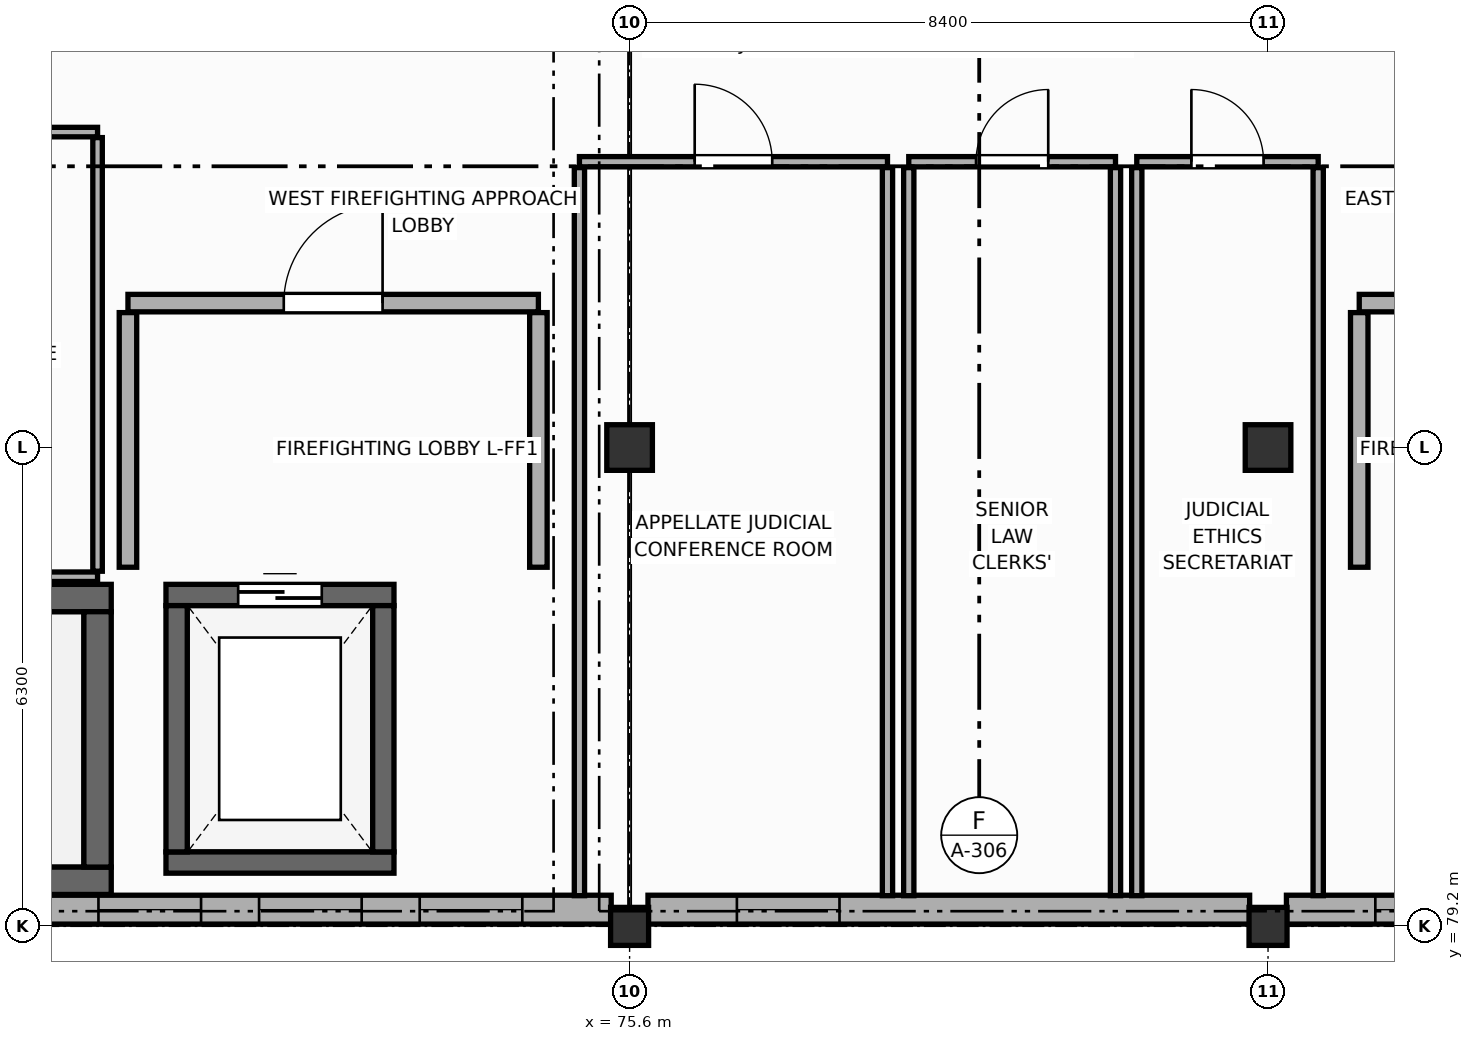
"""IFC4 building model, lengths in metres.
Left out: names, types, materials, properties, quantities, classifications, styles, units other than length and angle.
Written with IfcOpenShell. Run it as: python <this file> out.ifc"""

import sys

from ifc_helpers import new_model, si_unit, direction, frame, frame_2d, origin, origin_2d, place, context, subcontext, project, spatial, rectangle, extrude, element, fill, save


model = new_model("IFC4")
c1 = context("Model", 3, precision=1e-05, world=origin(), true_north=direction((0.0, 1.0)))
c2 = subcontext(c1, "Body", "Model", "MODEL_VIEW")
j1 = project(units=[si_unit("LENGTHUNIT", "METRE"), si_unit("PLANEANGLEUNIT", "RADIAN")], contexts=[c1])
p1 = place(None, origin())
s1 = spatial("IfcSite", under=j1, at=p1, CompositionType="ELEMENT")
p2 = place(p1, origin())
s2 = spatial("IfcBuilding", under=s1, at=p2, CompositionType="ELEMENT")
p3 = place(p2, frame((0.0, 0.0, 27.0)))
s3 = spatial("IfcBuildingStorey", under=s2, at=p3, CompositionType="ELEMENT", Elevation=27.0)
p4 = place(p3, frame((75.6, 79.2, 0.0), z_axis=(0.0, 0.0, 1.0), x_axis=(1.0, 0.0, 0.0)))
e1 = element("IfcColumn", 1, at=p4, inside=s3, PredefinedType="COLUMN", context=c2, shape_type="SweptSolid", body=[
    extrude(rectangle(XDim=0.5, YDim=0.5, at=origin_2d()), origin(), (0.0, 0.0, 1.0), 4.2),
])
p5 = place(p3, frame((75.6, 85.5, 0.0), z_axis=(0.0, 0.0, 1.0), x_axis=(1.0, 0.0, 0.0)))
e2 = element("IfcColumn", 2, at=p5, inside=s3, PredefinedType="COLUMN", context=c2, shape_type="SweptSolid", body=[
    extrude(rectangle(XDim=0.6, YDim=0.6, at=origin_2d()), origin(), (0.0, 0.0, 1.0), 4.2),
])
p6 = place(p3, frame((84.0, 79.2, 0.0), z_axis=(0.0, 0.0, 1.0), x_axis=(1.0, 0.0, 0.0)))
e3 = element("IfcColumn", 3, at=p6, inside=s3, PredefinedType="COLUMN", context=c2, shape_type="SweptSolid", body=[
    extrude(rectangle(XDim=0.5, YDim=0.5, at=origin_2d()), origin(), (0.0, 0.0, 1.0), 4.2),
])
p7 = place(p3, frame((84.0, 85.5, 0.0), z_axis=(0.0, 0.0, 1.0), x_axis=(1.0, 0.0, 0.0)))
e4 = element("IfcColumn", 4, at=p7, inside=s3, PredefinedType="COLUMN", context=c2, shape_type="SweptSolid", body=[
    extrude(rectangle(XDim=0.6, YDim=0.6, at=origin_2d()), origin(), (0.0, 0.0, 1.0), 4.2),
])
p8 = place(p3, frame((75.358, 79.42, 0.0), z_axis=(0.0, 0.0, 1.0), x_axis=(-1.0, 0.0, 0.0)))
e5 = element("IfcWall", 5, at=p8, inside=s3, PredefinedType="STANDARD", context=c2, shape_type="SweptSolid", body=[
    extrude(rectangle(XDim=7.916, YDim=0.38, at=frame_2d((3.958, 0.0))), origin(), (0.0, 0.0, 1.0), 3.51),
])
p9 = place(p8, frame((1.17, 0.0, 0.85)))
e6 = element("IfcOpeningElement", 6, at=p9, cuts=e5, PredefinedType="OPENING", context=c2, shape_type="SweptSolid", body=[
    extrude(rectangle(XDim=1.35, YDim=1.95, at=frame_2d((0.675, 0.975))), frame((0.0, 0.2, 0.0), z_axis=(0.0, -1.0, 0.0), x_axis=(1.0, 0.0, 0.0)), (0.0, 0.0, 1.0), 0.4),
])
p10 = place(p8, frame((3.283, 0.0, 0.85)))
e7 = element("IfcOpeningElement", 7, at=p10, cuts=e5, PredefinedType="OPENING", context=c2, shape_type="SweptSolid", body=[
    extrude(rectangle(XDim=1.35, YDim=1.95, at=frame_2d((0.675, 0.975))), frame((0.0, 0.2, 0.0), z_axis=(0.0, -1.0, 0.0), x_axis=(1.0, 0.0, 0.0)), (0.0, 0.0, 1.0), 0.4),
])
p11 = place(p8, frame((5.396, 0.0, 0.85)))
e8 = element("IfcOpeningElement", 8, at=p11, cuts=e5, PredefinedType="OPENING", context=c2, shape_type="SweptSolid", body=[
    extrude(rectangle(XDim=1.35, YDim=1.95, at=frame_2d((0.675, 0.975))), frame((0.0, 0.2, 0.0), z_axis=(0.0, -1.0, 0.0), x_axis=(1.0, 0.0, 0.0)), (0.0, 0.0, 1.0), 0.4),
])
p12 = place(p3, frame((83.758, 79.42, 0.0), z_axis=(0.0, 0.0, 1.0), x_axis=(-1.0, 0.0, 0.0)))
e9 = element("IfcWall", 9, at=p12, inside=s3, PredefinedType="STANDARD", context=c2, shape_type="SweptSolid", body=[
    extrude(rectangle(XDim=7.916, YDim=0.38, at=frame_2d((3.958, 0.0))), origin(), (0.0, 0.0, 1.0), 3.51),
])
p13 = place(p12, frame((5.396, 0.0, 0.85)))
e10 = element("IfcOpeningElement", 10, at=p13, cuts=e9, PredefinedType="OPENING", context=c2, shape_type="SweptSolid", body=[
    extrude(rectangle(XDim=1.35, YDim=1.95, at=frame_2d((0.675, 0.975))), frame((0.0, 0.2, 0.0), z_axis=(0.0, -1.0, 0.0), x_axis=(1.0, 0.0, 0.0)), (0.0, 0.0, 1.0), 0.4),
])
p14 = place(p3, frame((92.158, 79.42, 0.0), z_axis=(0.0, 0.0, 1.0), x_axis=(-1.0, 0.0, 0.0)))
e11 = element("IfcWall", 11, at=p14, inside=s3, PredefinedType="STANDARD", context=c2, shape_type="SweptSolid", body=[
    extrude(rectangle(XDim=7.916, YDim=0.38, at=frame_2d((3.958, 0.0))), origin(), (0.0, 0.0, 1.0), 3.51),
])
p15 = place(p14, frame((1.17, 0.0, 0.85)))
e12 = element("IfcOpeningElement", 12, at=p15, cuts=e11, PredefinedType="OPENING", context=c2, shape_type="SweptSolid", body=[
    extrude(rectangle(XDim=1.35, YDim=1.95, at=frame_2d((0.675, 0.975))), frame((0.0, 0.2, 0.0), z_axis=(0.0, -1.0, 0.0), x_axis=(1.0, 0.0, 0.0)), (0.0, 0.0, 1.0), 0.4),
])
p16 = place(p14, frame((3.283, 0.0, 0.85)))
e13 = element("IfcOpeningElement", 13, at=p16, cuts=e11, PredefinedType="OPENING", context=c2, shape_type="SweptSolid", body=[
    extrude(rectangle(XDim=1.35, YDim=1.95, at=frame_2d((0.675, 0.975))), frame((0.0, 0.2, 0.0), z_axis=(0.0, -1.0, 0.0), x_axis=(1.0, 0.0, 0.0)), (0.0, 0.0, 1.0), 0.4),
])
p17 = place(p14, frame((5.396, 0.0, 0.85)))
e14 = element("IfcOpeningElement", 14, at=p17, cuts=e11, PredefinedType="OPENING", context=c2, shape_type="SweptSolid", body=[
    extrude(rectangle(XDim=1.35, YDim=1.95, at=frame_2d((0.675, 0.975))), frame((0.0, 0.2, 0.0), z_axis=(0.0, -1.0, 0.0), x_axis=(1.0, 0.0, 0.0)), (0.0, 0.0, 1.0), 0.4),
])
for number, where, z_axis, x_axis in (
    (15, (59.42, 83.52, 0.0), (0.0, 0.0, 1.0), (1.0, 0.0, 0.0)),
    (16, (68.78, 79.8, 0.0), (0.0, 0.0, 1.0), (-1.0, 0.0, 0.0)),
):
    element("IfcWall", number, at=place(p3, frame(where, z_axis=z_axis, x_axis=x_axis)), inside=s3, PredefinedType="SHEAR", context=c2, shape_type="SweptSolid", body=[
        extrude(rectangle(XDim=9.36, YDim=0.36, at=frame_2d((4.68, 0.0))), origin(), (0.0, 0.0, 1.0), 3.98),
    ])
p18 = place(p3, frame((68.6, 83.34, 0.0), z_axis=(0.0, 0.0, 1.0), x_axis=(0.0, -1.0, 0.0)))
e17 = element("IfcWall", 17, at=p18, inside=s3, PredefinedType="SHEAR", context=c2, shape_type="SweptSolid", body=[
    extrude(rectangle(XDim=3.36, YDim=0.36, at=frame_2d((1.68, 0.0))), origin(), (0.0, 0.0, 1.0), 3.98),
])
p19 = place(p3, frame((69.5, 83.56, 0.0), z_axis=(0.0, 0.0, 1.0), x_axis=(1.0, 0.0, 0.0)))
e18 = element("IfcWall", 18, at=p19, inside=s3, PredefinedType="SHEAR", context=c2, shape_type="SweptSolid", body=[
    extrude(rectangle(XDim=3.0, YDim=0.28, at=frame_2d((1.5, 0.0))), origin(), (0.0, 0.0, 1.0), 3.98),
])
p20 = place(p19, frame((0.95, 0.0, 0.0)))
e19 = element("IfcOpeningElement", 19, at=p20, cuts=e18, PredefinedType="OPENING", context=c2, shape_type="SweptSolid", body=[
    extrude(rectangle(XDim=1.1, YDim=2.2, at=frame_2d((0.55, 1.1))), frame((0.0, 0.15, 0.0), z_axis=(0.0, -1.0, 0.0), x_axis=(1.0, 0.0, 0.0)), (0.0, 0.0, 1.0), 0.3),
])
p21 = place(p3, frame((72.5, 80.04, 0.0), z_axis=(0.0, 0.0, 1.0), x_axis=(-1.0, 0.0, 0.0)))
e20 = element("IfcWall", 20, at=p21, inside=s3, PredefinedType="SHEAR", context=c2, shape_type="SweptSolid", body=[
    extrude(rectangle(XDim=3.0, YDim=0.28, at=frame_2d((1.5, 0.0))), origin(), (0.0, 0.0, 1.0), 3.98),
])
for number, where, z_axis, x_axis in (
    (21, (69.64, 80.18, 0.0), (0.0, 0.0, 1.0), (0.0, 1.0, 0.0)),
    (22, (72.36, 83.42, 0.0), (0.0, 0.0, 1.0), (0.0, -1.0, 0.0)),
):
    element("IfcWall", number, at=place(p3, frame(where, z_axis=z_axis, x_axis=x_axis)), inside=s3, PredefinedType="SHEAR", context=c2, shape_type="SweptSolid", body=[
        extrude(rectangle(XDim=3.24, YDim=0.28, at=frame_2d((1.62, 0.0))), origin(), (0.0, 0.0, 1.0), 3.98),
    ])
p22 = place(p3, frame((69.0, 87.4, 0.0), z_axis=(0.0, 0.0, 1.0), x_axis=(1.0, 0.0, 0.0)))
e23 = element("IfcWall", 23, at=p22, inside=s3, PredefinedType="STANDARD", context=c2, shape_type="SweptSolid", body=[
    extrude(rectangle(XDim=5.4, YDim=0.23, at=frame_2d((2.7, 0.0))), origin(), (0.0, 0.0, 1.0), 3.965),
])
p23 = place(p22, frame((2.05, 0.0, 0.0)))
e24 = element("IfcOpeningElement", 24, at=p23, cuts=e23, PredefinedType="OPENING", context=c2, shape_type="SweptSolid", body=[
    extrude(rectangle(XDim=1.3, YDim=2.2, at=frame_2d((0.65, 1.1))), frame((0.0, 0.125, 0.0), z_axis=(0.0, -1.0, 0.0), x_axis=(1.0, 0.0, 0.0)), (0.0, 0.0, 1.0), 0.25),
])
for number, where, z_axis, x_axis in (
    (25, (69.0, 83.925, 0.0), (0.0, 0.0, 1.0), (0.0, 1.0, 0.0)),
    (26, (74.4, 87.275, 0.0), (0.0, 0.0, 1.0), (0.0, -1.0, 0.0)),
):
    element("IfcWall", number, at=place(p3, frame(where, z_axis=z_axis, x_axis=x_axis)), inside=s3, PredefinedType="STANDARD", context=c2, shape_type="SweptSolid", body=[
        extrude(rectangle(XDim=3.35, YDim=0.23, at=frame_2d((1.675, 0.0))), origin(), (0.0, 0.0, 1.0), 3.41),
    ])
p24 = place(p3, frame((85.2, 87.4, 0.0), z_axis=(0.0, 0.0, 1.0), x_axis=(1.0, 0.0, 0.0)))
e27 = element("IfcWall", 27, at=p24, inside=s3, PredefinedType="STANDARD", context=c2, shape_type="SweptSolid", body=[
    extrude(rectangle(XDim=5.4, YDim=0.23, at=frame_2d((2.7, 0.0))), origin(), (0.0, 0.0, 1.0), 3.965),
])
p25 = place(p24, frame((2.05, 0.0, 0.0)))
e28 = element("IfcOpeningElement", 28, at=p25, cuts=e27, PredefinedType="OPENING", context=c2, shape_type="SweptSolid", body=[
    extrude(rectangle(XDim=1.3, YDim=2.2, at=frame_2d((0.65, 1.1))), frame((0.0, 0.125, 0.0), z_axis=(0.0, -1.0, 0.0), x_axis=(1.0, 0.0, 0.0)), (0.0, 0.0, 1.0), 0.25),
])
p26 = place(p3, frame((85.2, 83.925, 0.0), z_axis=(0.0, 0.0, 1.0), x_axis=(0.0, 1.0, 0.0)))
e29 = element("IfcWall", 29, at=p26, inside=s3, PredefinedType="STANDARD", context=c2, shape_type="SweptSolid", body=[
    extrude(rectangle(XDim=3.35, YDim=0.23, at=frame_2d((1.675, 0.0))), origin(), (0.0, 0.0, 1.0), 3.41),
])
p27 = place(p3, frame((66.0, 89.65, 0.0), z_axis=(0.0, 0.0, 1.0), x_axis=(1.0, 0.0, 0.0)))
e30 = element("IfcWall", 30, at=p27, inside=s3, PredefinedType="PARTITIONING", context=c2, shape_type="SweptSolid", body=[
    extrude(rectangle(XDim=2.6, YDim=0.125, at=frame_2d((1.3, 0.0))), origin(), (0.0, 0.0, 1.0), 3.51),
])
p28 = place(p27, frame((0.8, 0.0, 0.0)))
e31 = element("IfcOpeningElement", 31, at=p28, cuts=e30, PredefinedType="OPENING", context=c2, shape_type="SweptSolid", body=[
    extrude(rectangle(XDim=1.0, YDim=2.1, at=frame_2d((0.5, 1.05))), frame((0.0, 0.073, 0.0), z_axis=(0.0, -1.0, 0.0), x_axis=(1.0, 0.0, 0.0)), (0.0, 0.0, 1.0), 0.145),
])
p29 = place(p3, frame((68.6, 83.8, 0.0), z_axis=(0.0, 0.0, 1.0), x_axis=(-1.0, 0.0, 0.0)))
e32 = element("IfcWall", 32, at=p29, inside=s3, PredefinedType="PARTITIONING", context=c2, shape_type="SweptSolid", body=[
    extrude(rectangle(XDim=2.6, YDim=0.125, at=frame_2d((1.3, 0.0))), origin(), (0.0, 0.0, 1.0), 3.51),
])
p30 = place(p3, frame((68.6, 89.577, 0.0), z_axis=(0.0, 0.0, 1.0), x_axis=(0.0, -1.0, 0.0)))
e33 = element("IfcWall", 33, at=p30, inside=s3, PredefinedType="PARTITIONING", context=c2, shape_type="SweptSolid", body=[
    extrude(rectangle(XDim=5.705, YDim=0.125, at=frame_2d((2.853, 0.0))), origin(), (0.0, 0.0, 1.0), 3.41),
])
p31 = place(p3, frame((74.94, 89.26, 0.0), z_axis=(0.0, 0.0, 1.0), x_axis=(1.0, 0.0, 0.0)))
e34 = element("IfcWall", 34, at=p31, inside=s3, PredefinedType="PARTITIONING", context=c2, shape_type="SweptSolid", body=[
    extrude(rectangle(XDim=4.053, YDim=0.135, at=frame_2d((2.026, 0.0))), origin(), (0.0, 0.0, 1.0), 3.51),
])
p32 = place(p31, frame((1.517, 0.0, 0.0)))
e35 = element("IfcOpeningElement", 35, at=p32, cuts=e34, PredefinedType="OPENING", context=c2, shape_type="SweptSolid", body=[
    extrude(rectangle(XDim=1.02, YDim=2.15, at=frame_2d((0.51, 1.075))), frame((0.0, 0.077, 0.0), z_axis=(0.0, -1.0, 0.0), x_axis=(1.0, 0.0, 0.0)), (0.0, 0.0, 1.0), 0.155),
])
for number, where, z_axis, x_axis in (
    (36, (74.94, 79.604, 0.0), (0.0, 0.0, 1.0), (0.0, 1.0, 0.0)),
    (37, (78.993, 89.183, 0.0), (0.0, 0.0, 1.0), (0.0, -1.0, 0.0)),
):
    element("IfcWall", number, at=place(p3, frame(where, z_axis=z_axis, x_axis=x_axis)), inside=s3, PredefinedType="PARTITIONING", context=c2, shape_type="SweptSolid", body=[
        extrude(rectangle(XDim=9.579, YDim=0.135, at=frame_2d((4.789, 0.0))), origin(), (0.0, 0.0, 1.0), 3.41),
    ])
p33 = place(p3, frame((79.273, 89.26, 0.0), z_axis=(0.0, 0.0, 1.0), x_axis=(1.0, 0.0, 0.0)))
e38 = element("IfcWall", 38, at=p33, inside=s3, PredefinedType="PARTITIONING", context=c2, shape_type="SweptSolid", body=[
    extrude(rectangle(XDim=2.72, YDim=0.135, at=frame_2d((1.36, 0.0))), origin(), (0.0, 0.0, 1.0), 3.965),
])
p34 = place(p33, frame((0.885, 0.0, 0.0)))
e39 = element("IfcOpeningElement", 39, at=p34, cuts=e38, PredefinedType="OPENING", context=c2, shape_type="SweptSolid", body=[
    extrude(rectangle(XDim=0.95, YDim=2.15, at=frame_2d((0.475, 1.075))), frame((0.0, 0.077, 0.0), z_axis=(0.0, -1.0, 0.0), x_axis=(1.0, 0.0, 0.0)), (0.0, 0.0, 1.0), 0.155),
])
for number, where, z_axis, x_axis in (
    (40, (79.273, 79.604, 0.0), (0.0, 0.0, 1.0), (0.0, 1.0, 0.0)),
    (41, (81.993, 89.183, 0.0), (0.0, 0.0, 1.0), (0.0, -1.0, 0.0)),
):
    element("IfcWall", number, at=place(p3, frame(where, z_axis=z_axis, x_axis=x_axis)), inside=s3, PredefinedType="PARTITIONING", context=c2, shape_type="SweptSolid", body=[
        extrude(rectangle(XDim=9.579, YDim=0.135, at=frame_2d((4.789, 0.0))), origin(), (0.0, 0.0, 1.0), 3.41),
    ])
p35 = place(p3, frame((82.273, 89.26, 0.0), z_axis=(0.0, 0.0, 1.0), x_axis=(1.0, 0.0, 0.0)))
e42 = element("IfcWall", 42, at=p35, inside=s3, PredefinedType="PARTITIONING", context=c2, shape_type="SweptSolid", body=[
    extrude(rectangle(XDim=2.387, YDim=0.135, at=frame_2d((1.193, 0.0))), origin(), (0.0, 0.0, 1.0), 3.51),
])
p36 = place(p35, frame((0.719, 0.0, 0.0)))
e43 = element("IfcOpeningElement", 43, at=p36, cuts=e42, PredefinedType="OPENING", context=c2, shape_type="SweptSolid", body=[
    extrude(rectangle(XDim=0.95, YDim=2.15, at=frame_2d((0.475, 1.075))), frame((0.0, 0.077, 0.0), z_axis=(0.0, -1.0, 0.0), x_axis=(1.0, 0.0, 0.0)), (0.0, 0.0, 1.0), 0.155),
])
for number, where, z_axis, x_axis in (
    (44, (82.273, 79.604, 0.0), (0.0, 0.0, 1.0), (0.0, 1.0, 0.0)),
    (45, (84.66, 89.183, 0.0), (0.0, 0.0, 1.0), (0.0, -1.0, 0.0)),
):
    element("IfcWall", number, at=place(p3, frame(where, z_axis=z_axis, x_axis=x_axis)), inside=s3, PredefinedType="PARTITIONING", context=c2, shape_type="SweptSolid", body=[
        extrude(rectangle(XDim=9.579, YDim=0.135, at=frame_2d((4.789, 0.0))), origin(), (0.0, 0.0, 1.0), 3.41),
    ])
p37 = place(p9, origin())
e46 = element("IfcWindow", 46, at=p37, inside=s3, PartitioningType="SINGLE_PANEL", PredefinedType="WINDOW", context=c2, shape_type="SweptSolid", body=[
    extrude(rectangle(XDim=1.35, YDim=1.95, at=frame_2d((0.675, 0.975))), frame((0.0, 0.03, 0.0), z_axis=(0.0, -1.0, 0.0), x_axis=(1.0, 0.0, 0.0)), (0.0, 0.0, 1.0), 0.06),
])
fill(e6, e46)
p38 = place(p10, origin())
e47 = element("IfcWindow", 47, at=p38, inside=s3, PartitioningType="SINGLE_PANEL", PredefinedType="WINDOW", context=c2, shape_type="SweptSolid", body=[
    extrude(rectangle(XDim=1.35, YDim=1.95, at=frame_2d((0.675, 0.975))), frame((0.0, 0.03, 0.0), z_axis=(0.0, -1.0, 0.0), x_axis=(1.0, 0.0, 0.0)), (0.0, 0.0, 1.0), 0.06),
])
fill(e7, e47)
p39 = place(p11, origin())
e48 = element("IfcWindow", 48, at=p39, inside=s3, PartitioningType="SINGLE_PANEL", PredefinedType="WINDOW", context=c2, shape_type="SweptSolid", body=[
    extrude(rectangle(XDim=1.35, YDim=1.95, at=frame_2d((0.675, 0.975))), frame((0.0, 0.03, 0.0), z_axis=(0.0, -1.0, 0.0), x_axis=(1.0, 0.0, 0.0)), (0.0, 0.0, 1.0), 0.06),
])
fill(e8, e48)
p40 = place(p13, origin())
e49 = element("IfcWindow", 49, at=p40, inside=s3, PartitioningType="SINGLE_PANEL", PredefinedType="WINDOW", context=c2, shape_type="SweptSolid", body=[
    extrude(rectangle(XDim=1.35, YDim=1.95, at=frame_2d((0.675, 0.975))), frame((0.0, 0.03, 0.0), z_axis=(0.0, -1.0, 0.0), x_axis=(1.0, 0.0, 0.0)), (0.0, 0.0, 1.0), 0.06),
])
fill(e10, e49)
p41 = place(p17, origin())
e50 = element("IfcWindow", 50, at=p41, inside=s3, PartitioningType="SINGLE_PANEL", PredefinedType="WINDOW", context=c2, shape_type="SweptSolid", body=[
    extrude(rectangle(XDim=1.35, YDim=1.95, at=frame_2d((0.675, 0.975))), frame((0.0, 0.03, 0.0), z_axis=(0.0, -1.0, 0.0), x_axis=(1.0, 0.0, 0.0)), (0.0, 0.0, 1.0), 0.06),
])
fill(e14, e50)
p42 = place(p20, origin())
e51 = element("IfcDoor", 51, at=p42, inside=s3, OperationType="DOUBLE_DOOR_SLIDING", PredefinedType="DOOR", context=c2, shape_type="SweptSolid", body=[
    extrude(rectangle(XDim=1.1, YDim=2.2, at=frame_2d((0.55, 1.1))), frame((0.0, 0.025, 0.0), z_axis=(0.0, -1.0, 0.0), x_axis=(1.0, 0.0, 0.0)), (0.0, 0.0, 1.0), 0.05),
])
fill(e19, e51)
p43 = place(p23, origin())
e52 = element("IfcDoor", 52, at=p43, inside=s3, OperationType="SINGLE_SWING_RIGHT", PredefinedType="DOOR", context=c2, shape_type="SweptSolid", body=[
    extrude(rectangle(XDim=1.3, YDim=2.2, at=frame_2d((0.65, 1.1))), frame((0.0, 0.025, 0.0), z_axis=(0.0, -1.0, 0.0), x_axis=(1.0, 0.0, 0.0)), (0.0, 0.0, 1.0), 0.05),
])
fill(e24, e52)
p44 = place(p32, origin())
e53 = element("IfcDoor", 53, at=p44, inside=s3, OperationType="SINGLE_SWING_LEFT", PredefinedType="DOOR", context=c2, shape_type="SweptSolid", body=[
    extrude(rectangle(XDim=1.02, YDim=2.15, at=frame_2d((0.51, 1.075))), frame((0.0, 0.025, 0.0), z_axis=(0.0, -1.0, 0.0), x_axis=(1.0, 0.0, 0.0)), (0.0, 0.0, 1.0), 0.05),
])
fill(e35, e53)
p45 = place(p34, origin())
e54 = element("IfcDoor", 54, at=p45, inside=s3, OperationType="SINGLE_SWING_RIGHT", PredefinedType="DOOR", context=c2, shape_type="SweptSolid", body=[
    extrude(rectangle(XDim=0.95, YDim=2.15, at=frame_2d((0.475, 1.075))), frame((0.0, 0.025, 0.0), z_axis=(0.0, -1.0, 0.0), x_axis=(1.0, 0.0, 0.0)), (0.0, 0.0, 1.0), 0.05),
])
fill(e39, e54)
p46 = place(p36, origin())
e55 = element("IfcDoor", 55, at=p46, inside=s3, OperationType="SINGLE_SWING_LEFT", PredefinedType="DOOR", context=c2, shape_type="SweptSolid", body=[
    extrude(rectangle(XDim=0.95, YDim=2.15, at=frame_2d((0.475, 1.075))), frame((0.0, 0.025, 0.0), z_axis=(0.0, -1.0, 0.0), x_axis=(1.0, 0.0, 0.0)), (0.0, 0.0, 1.0), 0.05),
])
fill(e43, e55)
save(model, sys.argv[1])
